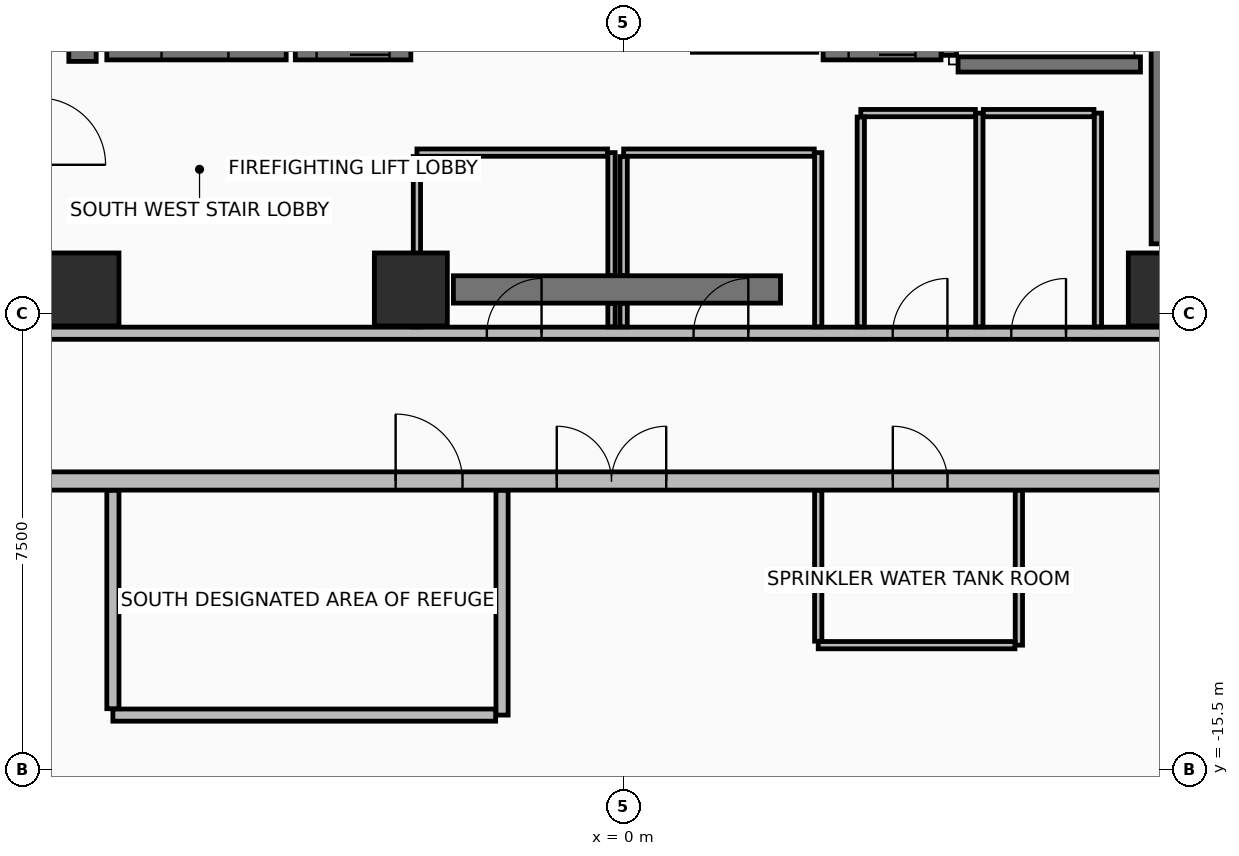
"""IFC4 building model, lengths in metres.
Left out: names, types, materials, properties, quantities, classifications, styles, units other than length and angle.
Written with IfcOpenShell. Run it as: python <this file> out.ifc"""

import sys

from ifc_helpers import new_model, si_unit, direction, frame, frame_2d, origin, origin_2d, place, context, subcontext, project, spatial, rectangle, extrude, element, fill, save


model = new_model("IFC4")
c1 = context("Model", 3, precision=1e-05, world=origin(), true_north=direction((0.0, 1.0)))
c2 = subcontext(c1, "Body", "Model", "MODEL_VIEW")
j1 = project(units=[si_unit("LENGTHUNIT", "METRE"), si_unit("PLANEANGLEUNIT", "RADIAN")], contexts=[c1])
p1 = place(None, origin())
s1 = spatial("IfcSite", under=j1, at=p1, CompositionType="ELEMENT")
p2 = place(p1, origin())
s2 = spatial("IfcBuilding", under=s1, at=p2, CompositionType="ELEMENT")
p3 = place(p2, frame((0.0, 0.0, 165.15)))
s3 = spatial("IfcBuildingStorey", under=s2, at=p3, CompositionType="ELEMENT", Elevation=165.15)
for number, where, z_axis, x_axis in (
    (1, (-8.9, -7.6, 0.0), (0.0, 0.0, 1.0), (1.0, 0.0, 0.0)),
    (2, (-3.5, -7.6, 0.0), (0.0, 0.0, 1.0), (1.0, 0.0, 0.0)),
    (3, (8.9, -7.6, 0.0), (0.0, 0.0, 1.0), (1.0, 0.0, 0.0)),
):
    element("IfcColumn", number, at=place(p3, frame(where, z_axis=z_axis, x_axis=x_axis)), inside=s3, PredefinedType="COLUMN", context=c2, shape_type="SweptSolid", body=[
        extrude(rectangle(XDim=1.2, YDim=1.2, at=origin_2d()), origin(), (0.0, 0.0, 1.0), 5.35),
    ])
p4 = place(p3, frame((-12.05, -10.75, 0.0), z_axis=(0.0, 0.0, 1.0), x_axis=(1.0, 0.0, 0.0)))
e4 = element("IfcWall", 4, at=p4, inside=s3, PredefinedType="STANDARD", context=c2, shape_type="SweptSolid", body=[
    extrude(rectangle(XDim=24.1, YDim=0.3, at=frame_2d((12.05, 0.0))), origin(), (0.0, 0.0, 1.0), 4.615),
])
p5 = place(p4, frame((10.95, 0.0, 0.0)))
e5 = element("IfcOpeningElement", 5, at=p5, cuts=e4, PredefinedType="OPENING", context=c2, shape_type="SweptSolid", body=[
    extrude(rectangle(XDim=1.8, YDim=2.3, at=frame_2d((0.9, 1.15))), frame((0.0, 0.16, 0.0), z_axis=(0.0, -1.0, 0.0), x_axis=(1.0, 0.0, 0.0)), (0.0, 0.0, 1.0), 0.32),
])
p6 = place(p4, frame((8.3, 0.0, 0.0)))
e6 = element("IfcOpeningElement", 6, at=p6, cuts=e4, PredefinedType="OPENING", context=c2, shape_type="SweptSolid", body=[
    extrude(rectangle(XDim=1.1, YDim=2.15, at=frame_2d((0.55, 1.075))), frame((0.0, 0.16, 0.0), z_axis=(0.0, -1.0, 0.0), x_axis=(1.0, 0.0, 0.0)), (0.0, 0.0, 1.0), 0.32),
])
p7 = place(p4, frame((16.477, 0.0, 0.0)))
e7 = element("IfcOpeningElement", 7, at=p7, cuts=e4, PredefinedType="OPENING", context=c2, shape_type="SweptSolid", body=[
    extrude(rectangle(XDim=0.9, YDim=2.1, at=frame_2d((0.45, 1.05))), frame((0.0, 0.16, 0.0), z_axis=(0.0, -1.0, 0.0), x_axis=(1.0, 0.0, 0.0)), (0.0, 0.0, 1.0), 0.32),
])
p8 = place(p3, frame((-2.8, -7.6, 0.0), z_axis=(0.0, 0.0, 1.0), x_axis=(1.0, 0.0, 0.0)))
e8 = element("IfcWall", 8, at=p8, inside=s3, PredefinedType="SHEAR", context=c2, shape_type="SweptSolid", body=[
    extrude(rectangle(XDim=5.38, YDim=0.45, at=frame_2d((2.69, 0.0))), origin(), (0.0, 0.0, 1.0), 5.17),
])
for number, where, z_axis, x_axis in (
    (9, (-8.9, -3.85, 0.0), (0.0, 0.0, 1.0), (0.0, 1.0, 0.0)),
    (10, (8.9, -6.85, 0.0), (0.0, 0.0, 1.0), (0.0, 1.0, 0.0)),
):
    element("IfcWall", number, at=place(p3, frame(where, z_axis=z_axis, x_axis=x_axis)), inside=s3, PredefinedType="SHEAR", context=c2, shape_type="SweptSolid", body=[
        extrude(rectangle(XDim=10.7, YDim=0.45, at=frame_2d((5.35, 0.0))), origin(), (0.0, 0.0, 1.0), 5.17),
    ])
p9 = place(p3, frame((-9.62, -8.32, 0.0), z_axis=(0.0, 0.0, 1.0), x_axis=(1.0, 0.0, 0.0)))
e11 = element("IfcWall", 11, at=p9, inside=s3, PredefinedType="PARTITIONING", context=c2, shape_type="SweptSolid", body=[
    extrude(rectangle(XDim=19.24, YDim=0.2, at=frame_2d((9.62, 0.0))), origin(), (0.0, 0.0, 1.0), 4.615),
])
p10 = place(p9, frame((7.37, 0.0, 0.0)))
e12 = element("IfcOpeningElement", 12, at=p10, cuts=e11, PredefinedType="OPENING", context=c2, shape_type="SweptSolid", body=[
    extrude(rectangle(XDim=0.9, YDim=2.1, at=frame_2d((0.45, 1.05))), frame((0.0, 0.11, 0.0), z_axis=(0.0, -1.0, 0.0), x_axis=(1.0, 0.0, 0.0)), (0.0, 0.0, 1.0), 0.22),
])
p11 = place(p9, frame((10.77, 0.0, 0.0)))
e13 = element("IfcOpeningElement", 13, at=p11, cuts=e11, PredefinedType="OPENING", context=c2, shape_type="SweptSolid", body=[
    extrude(rectangle(XDim=0.9, YDim=2.1, at=frame_2d((0.45, 1.05))), frame((0.0, 0.11, 0.0), z_axis=(0.0, -1.0, 0.0), x_axis=(1.0, 0.0, 0.0)), (0.0, 0.0, 1.0), 0.22),
])
p12 = place(p9, frame((14.045, 0.0, 0.0)))
e14 = element("IfcOpeningElement", 14, at=p12, cuts=e11, PredefinedType="OPENING", context=c2, shape_type="SweptSolid", body=[
    extrude(rectangle(XDim=0.9, YDim=2.1, at=frame_2d((0.45, 1.05))), frame((0.0, 0.11, 0.0), z_axis=(0.0, -1.0, 0.0), x_axis=(1.0, 0.0, 0.0)), (0.0, 0.0, 1.0), 0.22),
])
p13 = place(p9, frame((15.995, 0.0, 0.0)))
e15 = element("IfcOpeningElement", 15, at=p13, cuts=e11, PredefinedType="OPENING", context=c2, shape_type="SweptSolid", body=[
    extrude(rectangle(XDim=0.9, YDim=2.1, at=frame_2d((0.45, 1.05))), frame((0.0, 0.11, 0.0), z_axis=(0.0, -1.0, 0.0), x_axis=(1.0, 0.0, 0.0)), (0.0, 0.0, 1.0), 0.22),
])
p14 = place(p3, frame((-8.5, -3.7, 0.0), z_axis=(0.0, 0.0, 1.0), x_axis=(1.0, 0.0, 0.0)))
e16 = element("IfcWall", 16, at=p14, inside=s3, PredefinedType="SHEAR", context=c2, shape_type="SweptSolid", body=[
    extrude(rectangle(XDim=2.95, YDim=0.25, at=frame_2d((1.475, 0.0))), origin(), (0.0, 0.0, 1.0), 5.17),
])
p15 = place(p14, frame((0.9, 0.0, 0.0)))
e17 = element("IfcOpeningElement", 17, at=p15, cuts=e16, PredefinedType="OPENING", context=c2, shape_type="SweptSolid", body=[
    extrude(rectangle(XDim=1.1, YDim=2.15, at=frame_2d((0.55, 1.075))), frame((0.0, 0.135, 0.0), z_axis=(0.0, -1.0, 0.0), x_axis=(1.0, 0.0, 0.0)), (0.0, 0.0, 1.0), 0.27),
])
p16 = place(p3, frame((5.35, -3.75, 0.0), z_axis=(0.0, 0.0, 1.0), x_axis=(0.0, 1.0, 0.0)))
e18 = element("IfcWall", 18, at=p16, inside=s3, PredefinedType="SHEAR", context=c2, shape_type="SweptSolid", body=[
    extrude(rectangle(XDim=7.3, YDim=0.25, at=frame_2d((3.65, 0.0))), origin(), (0.0, 0.0, 1.0), 5.17),
])
p17 = place(p3, frame((5.5, -3.9, 0.0), z_axis=(0.0, 0.0, 1.0), x_axis=(1.0, 0.0, 0.0)))
e19 = element("IfcWall", 19, at=p17, inside=s3, PredefinedType="SHEAR", context=c2, shape_type="SweptSolid", body=[
    extrude(rectangle(XDim=3.0, YDim=0.25, at=frame_2d((1.5, 0.0))), origin(), (0.0, 0.0, 1.0), 5.17),
])
p18 = place(p3, frame((1.13, -3.6, 0.0), z_axis=(0.0, 0.0, 1.0), x_axis=(1.0, 0.0, 0.0)))
e20 = element("IfcWall", 20, at=p18, inside=s3, PredefinedType="PARTITIONING", context=c2, shape_type="SweptSolid", body=[
    extrude(rectangle(XDim=2.045, YDim=0.2, at=frame_2d((1.022, 0.0))), origin(), (0.0, 0.0, 1.0), 5.17),
])
p19 = place(p3, frame((-5.4, -3.7, 0.0), z_axis=(0.0, 0.0, 1.0), x_axis=(1.0, 0.0, 0.0)))
e21 = element("IfcWall", 21, at=p19, inside=s3, PredefinedType="SHEAR", context=c2, shape_type="SweptSolid", body=[
    extrude(rectangle(XDim=1.9, YDim=0.25, at=frame_2d((0.95, 0.0))), origin(), (0.0, 0.0, 1.0), 5.17),
])
p20 = place(p19, frame((0.35, 0.0, 0.0)))
e22 = element("IfcOpeningElement", 22, at=p20, cuts=e21, PredefinedType="OPENING", context=c2, shape_type="SweptSolid", body=[
    extrude(rectangle(XDim=1.2, YDim=2.2, at=frame_2d((0.6, 1.1))), frame((0.0, 0.135, 0.0), z_axis=(0.0, -1.0, 0.0), x_axis=(1.0, 0.0, 0.0)), (0.0, 0.0, 1.0), 0.27),
])
p21 = place(p3, frame((3.28, -3.7, 0.0), z_axis=(0.0, 0.0, 1.0), x_axis=(1.0, 0.0, 0.0)))
e23 = element("IfcWall", 23, at=p21, inside=s3, PredefinedType="SHEAR", context=c2, shape_type="SweptSolid", body=[
    extrude(rectangle(XDim=1.94, YDim=0.25, at=frame_2d((0.97, 0.0))), origin(), (0.0, 0.0, 1.0), 5.17),
])
p22 = place(p21, frame((0.42, 0.0, 0.0)))
e24 = element("IfcOpeningElement", 24, at=p22, cuts=e23, PredefinedType="OPENING", context=c2, shape_type="SweptSolid", body=[
    extrude(rectangle(XDim=1.1, YDim=2.2, at=frame_2d((0.55, 1.1))), frame((0.0, 0.135, 0.0), z_axis=(0.0, -1.0, 0.0), x_axis=(1.0, 0.0, 0.0)), (0.0, 0.0, 1.0), 0.27),
])
p23 = place(p3, frame((-0.2, -8.215, 0.0), z_axis=(0.0, 0.0, 1.0), x_axis=(0.0, 1.0, 0.0)))
e25 = element("IfcWall", 25, at=p23, inside=s3, PredefinedType="PARTITIONING", context=c2, shape_type="SweptSolid", body=[
    extrude(rectangle(XDim=0.385, YDim=0.12, at=frame_2d((0.192, 0.0))), origin(), (0.0, 0.0, 1.0), 4.365),
])
p24 = place(p3, frame((-0.2, -7.37, 0.0), z_axis=(0.0, 0.0, 1.0), x_axis=(0.0, 1.0, 0.0)))
e26 = element("IfcWall", 26, at=p24, inside=s3, PredefinedType="PARTITIONING", context=c2, shape_type="SweptSolid", body=[
    extrude(rectangle(XDim=2.02, YDim=0.12, at=frame_2d((1.01, 0.0))), origin(), (0.0, 0.0, 1.0), 4.365),
])
p25 = place(p3, frame((-0.265, -5.35, 0.0), z_axis=(0.0, 0.0, 1.0), x_axis=(-1.0, 0.0, 0.0)))
e27 = element("IfcWall", 27, at=p25, inside=s3, PredefinedType="PARTITIONING", context=c2, shape_type="SweptSolid", body=[
    extrude(rectangle(XDim=3.135, YDim=0.12, at=frame_2d((1.567, 0.0))), origin(), (0.0, 0.0, 1.0), 4.365),
])
p26 = place(p3, frame((-3.4, -5.415, 0.0), z_axis=(0.0, 0.0, 1.0), x_axis=(0.0, -1.0, 0.0)))
e28 = element("IfcWall", 28, at=p26, inside=s3, PredefinedType="PARTITIONING", context=c2, shape_type="SweptSolid", body=[
    extrude(rectangle(XDim=2.8, YDim=0.12, at=frame_2d((1.4, 0.0))), origin(), (0.0, 0.0, 1.0), 4.365),
])
p27 = place(p3, frame((3.2, -8.215, 0.0), z_axis=(0.0, 0.0, 1.0), x_axis=(0.0, 1.0, 0.0)))
e29 = element("IfcWall", 29, at=p27, inside=s3, PredefinedType="PARTITIONING", context=c2, shape_type="SweptSolid", body=[
    extrude(rectangle(XDim=2.865, YDim=0.12, at=frame_2d((1.433, 0.0))), origin(), (0.0, 0.0, 1.0), 4.365),
])
p28 = place(p3, frame((3.135, -5.35, 0.0), z_axis=(0.0, 0.0, 1.0), x_axis=(-1.0, 0.0, 0.0)))
e30 = element("IfcWall", 30, at=p28, inside=s3, PredefinedType="PARTITIONING", context=c2, shape_type="SweptSolid", body=[
    extrude(rectangle(XDim=3.135, YDim=0.12, at=frame_2d((1.567, 0.0))), origin(), (0.0, 0.0, 1.0), 5.17),
])
p29 = place(p3, frame((0.0, -5.415, 0.0), z_axis=(0.0, 0.0, 1.0), x_axis=(0.0, -1.0, 0.0)))
e31 = element("IfcWall", 31, at=p29, inside=s3, PredefinedType="PARTITIONING", context=c2, shape_type="SweptSolid", body=[
    extrude(rectangle(XDim=1.955, YDim=0.12, at=frame_2d((0.978, 0.0))), origin(), (0.0, 0.0, 1.0), 4.365),
])
p30 = place(p3, frame((0.0, -7.83, 0.0), z_axis=(0.0, 0.0, 1.0), x_axis=(0.0, -1.0, 0.0)))
e32 = element("IfcWall", 32, at=p30, inside=s3, PredefinedType="PARTITIONING", context=c2, shape_type="SweptSolid", body=[
    extrude(rectangle(XDim=0.385, YDim=0.12, at=frame_2d((0.192, 0.0))), origin(), (0.0, 0.0, 1.0), 4.365),
])
p31 = place(p3, frame((5.85, -8.215, 0.0), z_axis=(0.0, 0.0, 1.0), x_axis=(0.0, 1.0, 0.0)))
e33 = element("IfcWall", 33, at=p31, inside=s3, PredefinedType="PARTITIONING", context=c2, shape_type="SweptSolid", body=[
    extrude(rectangle(XDim=3.515, YDim=0.12, at=frame_2d((1.758, 0.0))), origin(), (0.0, 0.0, 1.0), 4.365),
])
p32 = place(p3, frame((5.785, -4.7, 0.0), z_axis=(0.0, 0.0, 1.0), x_axis=(-1.0, 0.0, 0.0)))
e34 = element("IfcWall", 34, at=p32, inside=s3, PredefinedType="PARTITIONING", context=c2, shape_type="SweptSolid", body=[
    extrude(rectangle(XDim=1.885, YDim=0.12, at=frame_2d((0.942, 0.0))), origin(), (0.0, 0.0, 1.0), 5.17),
])
p33 = place(p3, frame((3.9, -4.765, 0.0), z_axis=(0.0, 0.0, 1.0), x_axis=(0.0, -1.0, 0.0)))
e35 = element("IfcWall", 35, at=p33, inside=s3, PredefinedType="PARTITIONING", context=c2, shape_type="SweptSolid", body=[
    extrude(rectangle(XDim=3.45, YDim=0.12, at=frame_2d((1.725, 0.0))), origin(), (0.0, 0.0, 1.0), 4.365),
])
p34 = place(p3, frame((7.8, -8.215, 0.0), z_axis=(0.0, 0.0, 1.0), x_axis=(0.0, 1.0, 0.0)))
e36 = element("IfcWall", 36, at=p34, inside=s3, PredefinedType="PARTITIONING", context=c2, shape_type="SweptSolid", body=[
    extrude(rectangle(XDim=3.515, YDim=0.12, at=frame_2d((1.758, 0.0))), origin(), (0.0, 0.0, 1.0), 4.365),
])
p35 = place(p3, frame((7.735, -4.7, 0.0), z_axis=(0.0, 0.0, 1.0), x_axis=(-1.0, 0.0, 0.0)))
e37 = element("IfcWall", 37, at=p35, inside=s3, PredefinedType="PARTITIONING", context=c2, shape_type="SweptSolid", body=[
    extrude(rectangle(XDim=1.82, YDim=0.12, at=frame_2d((0.91, 0.0))), origin(), (0.0, 0.0, 1.0), 5.17),
])
p36 = place(p3, frame((-2.0, -10.905, 0.0), z_axis=(0.0, 0.0, 1.0), x_axis=(0.0, -1.0, 0.0)))
e38 = element("IfcWall", 38, at=p36, inside=s3, PredefinedType="PARTITIONING", context=c2, shape_type="SweptSolid", body=[
    extrude(rectangle(XDim=3.695, YDim=0.2, at=frame_2d((1.848, 0.0))), origin(), (0.0, 0.0, 1.0), 5.17),
])
p37 = place(p3, frame((-2.105, -14.6, 0.0), z_axis=(0.0, 0.0, 1.0), x_axis=(-1.0, 0.0, 0.0)))
e39 = element("IfcWall", 39, at=p37, inside=s3, PredefinedType="PARTITIONING", context=c2, shape_type="SweptSolid", body=[
    extrude(rectangle(XDim=6.295, YDim=0.2, at=frame_2d((3.147, 0.0))), origin(), (0.0, 0.0, 1.0), 5.17),
])
p38 = place(p3, frame((-8.4, -14.495, 0.0), z_axis=(0.0, 0.0, 1.0), x_axis=(0.0, 1.0, 0.0)))
e40 = element("IfcWall", 40, at=p38, inside=s3, PredefinedType="PARTITIONING", context=c2, shape_type="SweptSolid", body=[
    extrude(rectangle(XDim=3.59, YDim=0.2, at=frame_2d((1.795, 0.0))), origin(), (0.0, 0.0, 1.0), 5.17),
])
p39 = place(p3, frame((6.5, -10.905, 0.0), z_axis=(0.0, 0.0, 1.0), x_axis=(0.0, -1.0, 0.0)))
e41 = element("IfcWall", 41, at=p39, inside=s3, PredefinedType="PARTITIONING", context=c2, shape_type="SweptSolid", body=[
    extrude(rectangle(XDim=2.545, YDim=0.12, at=frame_2d((1.272, 0.0))), origin(), (0.0, 0.0, 1.0), 5.17),
])
p40 = place(p3, frame((6.435, -13.45, 0.0), z_axis=(0.0, 0.0, 1.0), x_axis=(-1.0, 0.0, 0.0)))
e42 = element("IfcWall", 42, at=p40, inside=s3, PredefinedType="PARTITIONING", context=c2, shape_type="SweptSolid", body=[
    extrude(rectangle(XDim=3.235, YDim=0.12, at=frame_2d((1.618, 0.0))), origin(), (0.0, 0.0, 1.0), 5.17),
])
p41 = place(p3, frame((3.2, -13.385, 0.0), z_axis=(0.0, 0.0, 1.0), x_axis=(0.0, 1.0, 0.0)))
e43 = element("IfcWall", 43, at=p41, inside=s3, PredefinedType="PARTITIONING", context=c2, shape_type="SweptSolid", body=[
    extrude(rectangle(XDim=2.48, YDim=0.12, at=frame_2d((1.24, 0.0))), origin(), (0.0, 0.0, 1.0), 5.17),
])
p42 = place(p5, frame((1.8, 0.0, 0.0), z_axis=(0.0, 0.0, 1.0), x_axis=(-1.0, 0.0, 0.0)))
e44 = element("IfcDoor", 44, at=p42, inside=s3, OperationType="DOUBLE_DOOR_SINGLE_SWING", PredefinedType="DOOR", context=c2, shape_type="SweptSolid", body=[
    extrude(rectangle(XDim=1.8, YDim=2.3, at=frame_2d((0.9, 1.15))), frame((0.0, 0.025, 0.0), z_axis=(0.0, -1.0, 0.0), x_axis=(1.0, 0.0, 0.0)), (0.0, 0.0, 1.0), 0.05),
])
fill(e5, e44)
p43 = place(p15, origin())
e45 = element("IfcDoor", 45, at=p43, inside=s3, OperationType="SINGLE_SWING_LEFT", PredefinedType="DOOR", context=c2, shape_type="SweptSolid", body=[
    extrude(rectangle(XDim=1.1, YDim=2.15, at=frame_2d((0.55, 1.075))), frame((0.0, 0.025, 0.0), z_axis=(0.0, -1.0, 0.0), x_axis=(1.0, 0.0, 0.0)), (0.0, 0.0, 1.0), 0.05),
])
fill(e17, e45)
p44 = place(p20, origin())
e46 = element("IfcDoor", 46, at=p44, inside=s3, OperationType="SLIDING_TO_RIGHT", PredefinedType="DOOR", context=c2, shape_type="SweptSolid", body=[
    extrude(rectangle(XDim=1.2, YDim=2.2, at=frame_2d((0.6, 1.1))), frame((0.0, 0.025, 0.0), z_axis=(0.0, -1.0, 0.0), x_axis=(1.0, 0.0, 0.0)), (0.0, 0.0, 1.0), 0.05),
])
fill(e22, e46)
p45 = place(p22, origin())
e47 = element("IfcDoor", 47, at=p45, inside=s3, OperationType="SLIDING_TO_LEFT", PredefinedType="DOOR", context=c2, shape_type="SweptSolid", body=[
    extrude(rectangle(XDim=1.1, YDim=2.2, at=frame_2d((0.55, 1.1))), frame((0.0, 0.025, 0.0), z_axis=(0.0, -1.0, 0.0), x_axis=(1.0, 0.0, 0.0)), (0.0, 0.0, 1.0), 0.05),
])
fill(e24, e47)
p46 = place(p10, frame((0.9, 0.0, 0.0), z_axis=(0.0, 0.0, 1.0), x_axis=(-1.0, 0.0, 0.0)))
e48 = element("IfcDoor", 48, at=p46, inside=s3, OperationType="SINGLE_SWING_LEFT", PredefinedType="DOOR", context=c2, shape_type="SweptSolid", body=[
    extrude(rectangle(XDim=0.9, YDim=2.1, at=frame_2d((0.45, 1.05))), frame((0.0, 0.025, 0.0), z_axis=(0.0, -1.0, 0.0), x_axis=(1.0, 0.0, 0.0)), (0.0, 0.0, 1.0), 0.05),
])
fill(e12, e48)
p47 = place(p11, frame((0.9, 0.0, 0.0), z_axis=(0.0, 0.0, 1.0), x_axis=(-1.0, 0.0, 0.0)))
e49 = element("IfcDoor", 49, at=p47, inside=s3, OperationType="SINGLE_SWING_LEFT", PredefinedType="DOOR", context=c2, shape_type="SweptSolid", body=[
    extrude(rectangle(XDim=0.9, YDim=2.1, at=frame_2d((0.45, 1.05))), frame((0.0, 0.025, 0.0), z_axis=(0.0, -1.0, 0.0), x_axis=(1.0, 0.0, 0.0)), (0.0, 0.0, 1.0), 0.05),
])
fill(e13, e49)
p48 = place(p12, frame((0.9, 0.0, 0.0), z_axis=(0.0, 0.0, 1.0), x_axis=(-1.0, 0.0, 0.0)))
e50 = element("IfcDoor", 50, at=p48, inside=s3, OperationType="SINGLE_SWING_LEFT", PredefinedType="DOOR", context=c2, shape_type="SweptSolid", body=[
    extrude(rectangle(XDim=0.9, YDim=2.1, at=frame_2d((0.45, 1.05))), frame((0.0, 0.025, 0.0), z_axis=(0.0, -1.0, 0.0), x_axis=(1.0, 0.0, 0.0)), (0.0, 0.0, 1.0), 0.05),
])
fill(e14, e50)
p49 = place(p13, frame((0.9, 0.0, 0.0), z_axis=(0.0, 0.0, 1.0), x_axis=(-1.0, 0.0, 0.0)))
e51 = element("IfcDoor", 51, at=p49, inside=s3, OperationType="SINGLE_SWING_LEFT", PredefinedType="DOOR", context=c2, shape_type="SweptSolid", body=[
    extrude(rectangle(XDim=0.9, YDim=2.1, at=frame_2d((0.45, 1.05))), frame((0.0, 0.025, 0.0), z_axis=(0.0, -1.0, 0.0), x_axis=(1.0, 0.0, 0.0)), (0.0, 0.0, 1.0), 0.05),
])
fill(e15, e51)
p50 = place(p6, origin())
e52 = element("IfcDoor", 52, at=p50, inside=s3, OperationType="SINGLE_SWING_LEFT", PredefinedType="DOOR", context=c2, shape_type="SweptSolid", body=[
    extrude(rectangle(XDim=1.1, YDim=2.15, at=frame_2d((0.55, 1.075))), frame((0.0, 0.025, 0.0), z_axis=(0.0, -1.0, 0.0), x_axis=(1.0, 0.0, 0.0)), (0.0, 0.0, 1.0), 0.05),
])
fill(e6, e52)
p51 = place(p7, origin())
e53 = element("IfcDoor", 53, at=p51, inside=s3, OperationType="SINGLE_SWING_LEFT", PredefinedType="DOOR", context=c2, shape_type="SweptSolid", body=[
    extrude(rectangle(XDim=0.9, YDim=2.1, at=frame_2d((0.45, 1.05))), frame((0.0, 0.025, 0.0), z_axis=(0.0, -1.0, 0.0), x_axis=(1.0, 0.0, 0.0)), (0.0, 0.0, 1.0), 0.05),
])
fill(e7, e53)
save(model, sys.argv[1])
